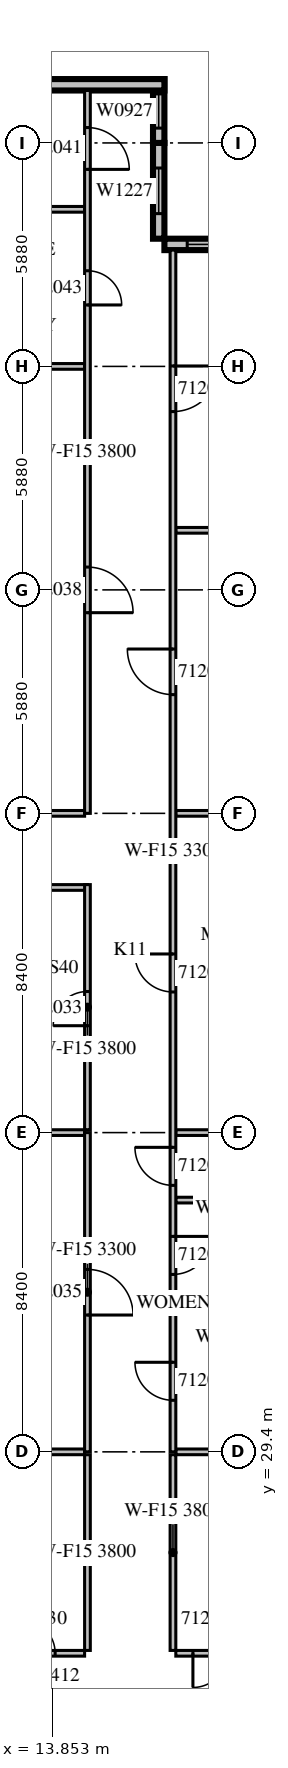
"""IFC4 building model, lengths in metres.
Left out: names, types, materials, properties, quantities, classifications, styles, units other than length and angle.
Written with IfcOpenShell. Run it as: python <this file> out.ifc"""

import sys

from ifc_helpers import new_model, si_unit, direction, frame, frame_2d, origin, place, context, subcontext, project, spatial, rectangle, extrude, source, transform, mapped, element, fill, save


model = new_model("IFC4")
c1 = context("Model", 3, precision=1e-05, world=origin(), true_north=direction((0.0, 1.0)))
c2 = subcontext(c1, "Body", "Model", "MODEL_VIEW")
j1 = project(units=[si_unit("LENGTHUNIT", "METRE"), si_unit("PLANEANGLEUNIT", "RADIAN")], contexts=[c1])
p1 = place(None, origin())
s1 = spatial("IfcSite", under=j1, at=p1, CompositionType="ELEMENT")
p2 = place(p1, origin())
s2 = spatial("IfcBuilding", under=s1, at=p2, CompositionType="ELEMENT")
p3 = place(p2, frame((0.0, 0.0, 61.5)))
s3 = spatial("IfcBuildingStorey", under=s2, at=p3, CompositionType="ELEMENT", Elevation=61.5)
m1 = source(origin(), c2, "Body", "SweptSolid", [
    extrude(rectangle(XDim=4.2, YDim=0.3, at=frame_2d((2.1, 0.0))), origin(), (0.0, 0.0, 1.0), 3.8),
])
p4 = place(p3, frame((21.0, 61.17, 0.0), z_axis=(0.0, 0.0, 1.0), x_axis=(-1.0, 0.0, 0.0)))
e1 = element("IfcWall", 1, at=p4, inside=s3, PredefinedType="STANDARD", context=c2, shape_type="MappedRepresentation", body=[
    mapped(m1, transform((0.0, 0.0, 0.0), scale=1.0)),
])
m2 = source(origin(), c2, "Body", "SweptSolid", [
    extrude(rectangle(XDim=3.0, YDim=2.7, at=frame_2d((1.5, 1.35))), frame((0.0, 0.16, 0.0), z_axis=(0.0, -1.0, 0.0), x_axis=(1.0, 0.0, 0.0)), (0.0, 0.0, 1.0), 0.32),
])
p5 = place(p4, frame((0.6, 0.0, 0.6)))
e2 = element("IfcOpeningElement", 2, at=p5, cuts=e1, PredefinedType="OPENING", context=c2, shape_type="MappedRepresentation", body=[
    mapped(m2, transform((0.0, 0.0, 0.0), scale=1.0)),
])
m3 = source(origin(), c2, "Body", "SweptSolid", [
    extrude(rectangle(XDim=2.52, YDim=0.3, at=frame_2d((1.26, 0.0))), origin(), (0.0, 0.0, 1.0), 3.8),
])
p6 = place(p3, frame((16.65, 61.32, 0.0), z_axis=(0.0, 0.0, 1.0), x_axis=(0.0, 1.0, 0.0)))
e3 = element("IfcWall", 3, at=p6, inside=s3, PredefinedType="STANDARD", context=c2, shape_type="MappedRepresentation", body=[
    mapped(m3, transform((0.0, 0.0, 0.0), scale=1.0)),
])
m4 = source(origin(), c2, "Body", "SweptSolid", [
    extrude(rectangle(XDim=1.2, YDim=2.7, at=frame_2d((0.6, 1.35))), frame((0.0, 0.16, 0.0), z_axis=(0.0, -1.0, 0.0), x_axis=(1.0, 0.0, 0.0)), (0.0, 0.0, 1.0), 0.32),
])
p7 = place(p6, frame((0.66, 0.0, 0.6)))
e4 = element("IfcOpeningElement", 4, at=p7, cuts=e3, PredefinedType="OPENING", context=c2, shape_type="MappedRepresentation", body=[
    mapped(m4, transform((0.0, 0.0, 0.0), scale=1.0)),
])
m5 = source(origin(), c2, "Body", "SweptSolid", [
    extrude(rectangle(XDim=1.68, YDim=0.3, at=frame_2d((0.84, 0.0))), origin(), (0.0, 0.0, 1.0), 3.8),
])
p8 = place(p3, frame((16.65, 63.84, 0.0), z_axis=(0.0, 0.0, 1.0), x_axis=(0.0, 1.0, 0.0)))
e5 = element("IfcWall", 5, at=p8, inside=s3, PredefinedType="STANDARD", context=c2, shape_type="MappedRepresentation", body=[
    mapped(m5, transform((0.0, 0.0, 0.0), scale=1.0)),
])
m6 = source(origin(), c2, "Body", "SweptSolid", [
    extrude(rectangle(XDim=0.9, YDim=2.7, at=frame_2d((0.45, 1.35))), frame((0.0, 0.16, 0.0), z_axis=(0.0, -1.0, 0.0), x_axis=(1.0, 0.0, 0.0)), (0.0, 0.0, 1.0), 0.32),
])
p9 = place(p8, frame((0.39, 0.0, 0.6)))
e6 = element("IfcOpeningElement", 6, at=p9, cuts=e5, PredefinedType="OPENING", context=c2, shape_type="MappedRepresentation", body=[
    mapped(m6, transform((0.0, 0.0, 0.0), scale=1.0)),
])
m7 = source(origin(), c2, "Body", "SweptSolid", [
    extrude(rectangle(XDim=3.15, YDim=0.3, at=frame_2d((1.575, 0.0))), origin(), (0.0, 0.0, 1.0), 3.8),
])
p10 = place(p3, frame((16.8, 65.37, 0.0), z_axis=(0.0, 0.0, 1.0), x_axis=(-1.0, 0.0, 0.0)))
e7 = element("IfcWall", 7, at=p10, inside=s3, PredefinedType="STANDARD", context=c2, shape_type="MappedRepresentation", body=[
    mapped(m7, transform((0.0, 0.0, 0.0), scale=1.0)),
])
p11 = place(p3, frame((3.075, 24.1, 0.0), z_axis=(0.0, 0.0, 1.0), x_axis=(1.0, 0.0, 0.0)))
e8 = element("IfcWall", 8, at=p11, inside=s3, PredefinedType="PARTITIONING", context=c2, shape_type="SweptSolid", body=[
    extrude(rectangle(XDim=11.625, YDim=0.15, at=frame_2d((5.812, 0.0))), origin(), (0.0, 0.0, 1.0), 3.8),
])
m8 = source(origin(), c2, "Body", "SweptSolid", [
    extrude(rectangle(XDim=0.9, YDim=2.1, at=frame_2d((0.45, 1.05))), frame((0.0, 0.085, 0.0), z_axis=(0.0, -1.0, 0.0), x_axis=(1.0, 0.0, 0.0)), (0.0, 0.0, 1.0), 0.17),
])
p12 = place(p11, frame((3.263, 0.0, 0.0)))
e9 = element("IfcOpeningElement", 9, at=p12, cuts=e8, PredefinedType="OPENING", context=c2, shape_type="MappedRepresentation", body=[
    mapped(m8, transform((0.0, 0.0, 0.0), scale=1.0)),
])
p13 = place(p11, frame((9.95, 0.0, 0.0)))
e10 = element("IfcOpeningElement", 10, at=p13, cuts=e8, PredefinedType="OPENING", context=c2, shape_type="MappedRepresentation", body=[
    mapped(m8, transform((0.0, 0.0, 0.0), scale=1.0)),
])
m9 = source(origin(), c2, "Body", "SweptSolid", [
    extrude(rectangle(XDim=3.6, YDim=0.15, at=frame_2d((1.8, 0.0))), origin(), (0.0, 0.0, 1.0), 3.8),
])
p14 = place(p3, frame((17.1, 24.1, 0.0), z_axis=(0.0, 0.0, 1.0), x_axis=(1.0, 0.0, 0.0)))
e11 = element("IfcWall", 11, at=p14, inside=s3, PredefinedType="PARTITIONING", context=c2, shape_type="MappedRepresentation", body=[
    mapped(m9, transform((0.0, 0.0, 0.0), scale=1.0)),
])
p15 = place(p14, frame((0.45, 0.0, 0.0)))
e12 = element("IfcOpeningElement", 12, at=p15, cuts=e11, PredefinedType="OPENING", context=c2, shape_type="MappedRepresentation", body=[
    mapped(m8, transform((0.0, 0.0, 0.0), scale=1.0)),
])
m10 = source(origin(), c2, "Body", "SweptSolid", [
    extrude(rectangle(XDim=5.15, YDim=0.15, at=frame_2d((2.575, 0.0))), origin(), (0.0, 0.0, 1.0), 3.8),
])
for number, where, z_axis, x_axis in (
    (13, (14.775, 24.175, 0.0), (0.0, 0.0, 1.0), (0.0, 1.0, 0.0)),
    (14, (17.025, 29.325, 0.0), (0.0, 0.0, 1.0), (0.0, -1.0, 0.0)),
):
    element("IfcWall", number, at=place(p3, frame(where, z_axis=z_axis, x_axis=x_axis)), inside=s3, PredefinedType="PARTITIONING", context=c2, shape_type="MappedRepresentation", body=[
        mapped(m10, transform((0.0, 0.0, 0.0), scale=1.0)),
    ])
m11 = source(origin(), c2, "Body", "SweptSolid", [
    extrude(rectangle(XDim=3.601, YDim=0.15, at=frame_2d((1.8, 0.0))), origin(), (0.0, 0.0, 1.0), 3.8),
])
p16 = place(p3, frame((14.7, 29.4, 0.0), z_axis=(0.0, 0.0, 1.0), x_axis=(-1.0, 0.0, 0.0)))
e15 = element("IfcWall", 15, at=p16, inside=s3, PredefinedType="PARTITIONING", context=c2, shape_type="MappedRepresentation", body=[
    mapped(m11, transform((0.0, 0.0, 0.0), scale=1.0)),
])
m12 = source(origin(), c2, "Body", "SweptSolid", [
    extrude(rectangle(XDim=2.701, YDim=0.15, at=frame_2d((1.351, 0.0))), origin(), (0.0, 0.0, 1.0), 3.8),
])
p17 = place(p3, frame((19.801, 29.4, 0.0), z_axis=(0.0, 0.0, 1.0), x_axis=(-1.0, 0.0, 0.0)))
e16 = element("IfcWall", 16, at=p17, inside=s3, PredefinedType="PARTITIONING", context=c2, shape_type="MappedRepresentation", body=[
    mapped(m12, transform((0.0, 0.0, 0.0), scale=1.0)),
])
m13 = source(origin(), c2, "Body", "SweptSolid", [
    extrude(rectangle(XDim=2.475, YDim=0.15, at=frame_2d((1.238, 0.0))), origin(), (0.0, 0.0, 1.0), 3.8),
])
p18 = place(p3, frame((14.775, 44.25, 0.0), z_axis=(0.0, 0.0, 1.0), x_axis=(-1.0, 0.0, 0.0)))
e17 = element("IfcWall", 17, at=p18, inside=s3, PredefinedType="PARTITIONING", context=c2, shape_type="MappedRepresentation", body=[
    mapped(m13, transform((0.0, 0.0, 0.0), scale=1.0)),
])
m14 = source(origin(), c2, "Body", "SweptSolid", [
    extrude(rectangle(XDim=6.45, YDim=0.15, at=frame_2d((3.225, 0.0))), origin(), (0.0, 0.0, 1.0), 3.8),
])
p19 = place(p3, frame((14.775, 37.875, 0.0), z_axis=(0.0, 0.0, 1.0), x_axis=(0.0, 1.0, 0.0)))
e18 = element("IfcWall", 18, at=p19, inside=s3, PredefinedType="PARTITIONING", context=c2, shape_type="MappedRepresentation", body=[
    mapped(m14, transform((0.0, 0.0, 0.0), scale=1.0)),
])
p20 = place(p19, frame((2.737, 0.0, 0.0)))
e19 = element("IfcOpeningElement", 19, at=p20, cuts=e18, PredefinedType="OPENING", context=c2, shape_type="MappedRepresentation", body=[
    mapped(m8, transform((0.0, 0.0, 0.0), scale=1.0)),
])
m15 = source(origin(), c2, "Body", "SweptSolid", [
    extrude(rectangle(XDim=3.45, YDim=0.15, at=frame_2d((1.725, 0.0))), origin(), (0.0, 0.0, 1.0), 3.8),
])
for number, where, z_axis, x_axis in (
    (20, (14.7, 37.8, 0.0), (0.0, 0.0, 1.0), (-1.0, 0.0, 0.0)),
    (21, (14.7, 62.093, 0.0), (0.0, 0.0, 1.0), (-1.0, 0.0, 0.0)),
    (22, (14.7, 46.2, 0.0), (0.0, 0.0, 1.0), (-1.0, 0.0, 0.0)),
    (23, (14.7, 57.96, 0.0), (0.0, 0.0, 1.0), (-1.0, 0.0, 0.0)),
):
    element("IfcWall", number, at=place(p3, frame(where, z_axis=z_axis, x_axis=x_axis)), inside=s3, PredefinedType="PARTITIONING", context=c2, shape_type="MappedRepresentation", body=[
        mapped(m15, transform((0.0, 0.0, 0.0), scale=1.0)),
    ])
m16 = source(origin(), c2, "Body", "SweptSolid", [
    extrude(rectangle(XDim=3.6, YDim=0.15, at=frame_2d((1.8, 0.0))), origin(), (0.0, 0.0, 1.0), 2.8),
])
for number, where, z_axis, x_axis in (
    (24, (17.1, 33.113, 0.0), (0.0, 0.0, 1.0), (1.0, 0.0, 0.0)),
    (25, (17.1, 36.024, 0.0), (0.0, 0.0, 1.0), (1.0, 0.0, 0.0)),
):
    element("IfcWall", number, at=place(p3, frame(where, z_axis=z_axis, x_axis=x_axis)), inside=s3, PredefinedType="PARTITIONING", context=c2, shape_type="MappedRepresentation", body=[
        mapped(m16, transform((0.0, 0.0, 0.0), scale=1.0)),
    ])
p21 = place(p3, frame((17.1, 53.648, 0.0), z_axis=(0.0, 0.0, 1.0), x_axis=(1.0, 0.0, 0.0)))
e26 = element("IfcWall", 26, at=p21, inside=s3, PredefinedType="PARTITIONING", context=c2, shape_type="MappedRepresentation", body=[
    mapped(m9, transform((0.0, 0.0, 0.0), scale=1.0)),
])
for number, where, z_axis, x_axis in (
    (27, (19.801, 37.8, 0.0), (0.0, 0.0, 1.0), (-1.0, 0.0, 0.0)),
    (28, (19.801, 46.2, 0.0), (0.0, 0.0, 1.0), (-1.0, 0.0, 0.0)),
):
    element("IfcWall", number, at=place(p3, frame(where, z_axis=z_axis, x_axis=x_axis)), inside=s3, PredefinedType="PARTITIONING", context=c2, shape_type="MappedRepresentation", body=[
        mapped(m12, transform((0.0, 0.0, 0.0), scale=1.0)),
    ])
m17 = source(origin(), c2, "Body", "SweptSolid", [
    extrude(rectangle(XDim=8.4, YDim=0.15, at=frame_2d((4.2, 0.0))), origin(), (0.0, 0.0, 1.0), 3.3),
])
p22 = place(p3, frame((14.775, 29.4, 0.0), z_axis=(0.0, 0.0, 1.0), x_axis=(0.0, 1.0, 0.0)))
e29 = element("IfcWall", 29, at=p22, inside=s3, PredefinedType="PARTITIONING", context=c2, shape_type="MappedRepresentation", body=[
    mapped(m17, transform((0.0, 0.0, 0.0), scale=1.0)),
])
m18 = source(origin(), c2, "Body", "SweptSolid", [
    extrude(rectangle(XDim=1.2, YDim=2.1, at=frame_2d((0.6, 1.05))), frame((0.0, 0.085, 0.0), z_axis=(0.0, -1.0, 0.0), x_axis=(1.0, 0.0, 0.0)), (0.0, 0.0, 1.0), 0.17),
])
p23 = place(p22, frame((3.6, 0.0, 0.0)))
e30 = element("IfcOpeningElement", 30, at=p23, cuts=e29, PredefinedType="OPENING", context=c2, shape_type="MappedRepresentation", body=[
    mapped(m18, transform((0.0, 0.0, 0.0), scale=1.0)),
])
m19 = source(origin(), c2, "Body", "SweptSolid", [
    extrude(rectangle(XDim=19.02, YDim=0.15, at=frame_2d((9.51, 0.0))), origin(), (0.0, 0.0, 1.0), 3.8),
])
p24 = place(p3, frame((14.775, 46.2, 0.0), z_axis=(0.0, 0.0, 1.0), x_axis=(0.0, 1.0, 0.0)))
e31 = element("IfcWall", 31, at=p24, inside=s3, PredefinedType="PARTITIONING", context=c2, shape_type="MappedRepresentation", body=[
    mapped(m19, transform((0.0, 0.0, 0.0), scale=1.0)),
])
p25 = place(p24, frame((5.28, 0.0, 0.0)))
e32 = element("IfcOpeningElement", 32, at=p25, cuts=e31, PredefinedType="OPENING", context=c2, shape_type="MappedRepresentation", body=[
    mapped(m18, transform((0.0, 0.0, 0.0), scale=1.0)),
])
m20 = source(origin(), c2, "Body", "SweptSolid", [
    extrude(rectangle(XDim=1.1, YDim=2.1, at=frame_2d((0.55, 1.05))), frame((0.0, 0.085, 0.0), z_axis=(0.0, -1.0, 0.0), x_axis=(1.0, 0.0, 0.0)), (0.0, 0.0, 1.0), 0.17),
])
p26 = place(p24, frame((16.944, 0.0, 0.0)))
e33 = element("IfcOpeningElement", 33, at=p26, cuts=e31, PredefinedType="OPENING", context=c2, shape_type="MappedRepresentation", body=[
    mapped(m20, transform((0.0, 0.0, 0.0), scale=1.0)),
])
p27 = place(p24, frame((13.377, 0.0, 0.0)))
e34 = element("IfcOpeningElement", 34, at=p27, cuts=e31, PredefinedType="OPENING", context=c2, shape_type="MappedRepresentation", body=[
    mapped(m8, transform((0.0, 0.0, 0.0), scale=1.0)),
])
m21 = source(origin(), c2, "Body", "SweptSolid", [
    extrude(rectangle(XDim=31.62, YDim=0.15, at=frame_2d((15.81, 0.0))), origin(), (0.0, 0.0, 1.0), 3.3),
])
p28 = place(p3, frame((17.025, 61.02, 0.0), z_axis=(0.0, 0.0, 1.0), x_axis=(0.0, -1.0, 0.0)))
e35 = element("IfcWall", 35, at=p28, inside=s3, PredefinedType="PARTITIONING", context=c2, shape_type="MappedRepresentation", body=[
    mapped(m21, transform((0.0, 0.0, 0.0), scale=1.0)),
])
m22 = source(origin(), c2, "Body", "SweptSolid", [
    extrude(rectangle(XDim=1.0, YDim=2.1, at=frame_2d((0.5, 1.05))), frame((0.0, 0.085, 0.0), z_axis=(0.0, -1.0, 0.0), x_axis=(1.0, 0.0, 0.0)), (0.0, 0.0, 1.0), 0.17),
])
p29 = place(p28, frame((29.263, 0.0, 0.0)))
e36 = element("IfcOpeningElement", 36, at=p29, cuts=e35, PredefinedType="OPENING", context=c2, shape_type="MappedRepresentation", body=[
    mapped(m22, transform((0.0, 0.0, 0.0), scale=1.0)),
])
p30 = place(p28, frame((25.951, 0.0, 0.0)))
e37 = element("IfcOpeningElement", 37, at=p30, cuts=e35, PredefinedType="OPENING", context=c2, shape_type="MappedRepresentation", body=[
    mapped(m22, transform((0.0, 0.0, 0.0), scale=1.0)),
])
p31 = place(p28, frame((23.608, 0.0, 0.0)))
e38 = element("IfcOpeningElement", 38, at=p31, cuts=e35, PredefinedType="OPENING", context=c2, shape_type="MappedRepresentation", body=[
    mapped(m22, transform((0.0, 0.0, 0.0), scale=1.0)),
])
p32 = place(p28, frame((18.52, 0.0, 0.0)))
e39 = element("IfcOpeningElement", 39, at=p32, cuts=e35, PredefinedType="OPENING", context=c2, shape_type="MappedRepresentation", body=[
    mapped(m22, transform((0.0, 0.0, 0.0), scale=1.0)),
])
p33 = place(p28, frame((10.496, 0.0, 0.0)))
e40 = element("IfcOpeningElement", 40, at=p33, cuts=e35, PredefinedType="OPENING", context=c2, shape_type="MappedRepresentation", body=[
    mapped(m18, transform((0.0, 0.0, 0.0), scale=1.0)),
])
p34 = place(p28, frame((3.049, 0.0, 0.0)))
e41 = element("IfcOpeningElement", 41, at=p34, cuts=e35, PredefinedType="OPENING", context=c2, shape_type="MappedRepresentation", body=[
    mapped(m18, transform((0.0, 0.0, 0.0), scale=1.0)),
])
m23 = source(origin(), c2, "Body", "SweptSolid", [
    extrude(rectangle(XDim=3.0, YDim=2.7, at=frame_2d((1.5, 1.35))), frame((0.0, 0.03, 0.0), z_axis=(0.0, -1.0, 0.0), x_axis=(1.0, 0.0, 0.0)), (0.0, 0.0, 1.0), 0.06),
])
p35 = place(p5, origin())
e42 = element("IfcWindow", 42, at=p35, inside=s3, PartitioningType="SINGLE_PANEL", PredefinedType="WINDOW", context=c2, shape_type="MappedRepresentation", body=[
    mapped(m23, transform((0.0, 0.0, 0.0), scale=1.0)),
])
fill(e2, e42)
m24 = source(origin(), c2, "Body", "SweptSolid", [
    extrude(rectangle(XDim=1.2, YDim=2.7, at=frame_2d((0.6, 1.35))), frame((0.0, 0.03, 0.0), z_axis=(0.0, -1.0, 0.0), x_axis=(1.0, 0.0, 0.0)), (0.0, 0.0, 1.0), 0.06),
])
p36 = place(p7, origin())
e43 = element("IfcWindow", 43, at=p36, inside=s3, PartitioningType="SINGLE_PANEL", PredefinedType="WINDOW", context=c2, shape_type="MappedRepresentation", body=[
    mapped(m24, transform((0.0, 0.0, 0.0), scale=1.0)),
])
fill(e4, e43)
m25 = source(origin(), c2, "Body", "SweptSolid", [
    extrude(rectangle(XDim=0.9, YDim=2.7, at=frame_2d((0.45, 1.35))), frame((0.0, 0.03, 0.0), z_axis=(0.0, -1.0, 0.0), x_axis=(1.0, 0.0, 0.0)), (0.0, 0.0, 1.0), 0.06),
])
p37 = place(p9, origin())
e44 = element("IfcWindow", 44, at=p37, inside=s3, PartitioningType="SINGLE_PANEL", PredefinedType="WINDOW", context=c2, shape_type="MappedRepresentation", body=[
    mapped(m25, transform((0.0, 0.0, 0.0), scale=1.0)),
])
fill(e6, e44)
m26 = source(origin(), c2, "Body", "SweptSolid", [
    extrude(rectangle(XDim=0.9, YDim=2.1, at=frame_2d((0.45, 1.05))), frame((0.0, 0.025, 0.0), z_axis=(0.0, -1.0, 0.0), x_axis=(1.0, 0.0, 0.0)), (0.0, 0.0, 1.0), 0.05),
])
p38 = place(p13, origin())
e45 = element("IfcDoor", 45, at=p38, inside=s3, OperationType="SINGLE_SWING_LEFT", PredefinedType="DOOR", context=c2, shape_type="MappedRepresentation", body=[
    mapped(m26, transform((0.0, 0.0, 0.0), scale=1.0)),
])
fill(e10, e45)
p39 = place(p15, origin())
e46 = element("IfcDoor", 46, at=p39, inside=s3, OperationType="SINGLE_SWING_RIGHT", PredefinedType="DOOR", context=c2, shape_type="MappedRepresentation", body=[
    mapped(m26, transform((0.0, 0.0, 0.0), scale=1.0)),
])
fill(e12, e46)
p40 = place(p20, origin())
e47 = element("IfcDoor", 47, at=p40, inside=s3, OperationType="SINGLE_SWING_LEFT", PredefinedType="DOOR", context=c2, shape_type="MappedRepresentation", body=[
    mapped(m26, transform((0.0, 0.0, 0.0), scale=1.0)),
])
fill(e19, e47)
m27 = source(origin(), c2, "Body", "SweptSolid", [
    extrude(rectangle(XDim=1.2, YDim=2.1, at=frame_2d((0.6, 1.05))), frame((0.0, 0.025, 0.0), z_axis=(0.0, -1.0, 0.0), x_axis=(1.0, 0.0, 0.0)), (0.0, 0.0, 1.0), 0.05),
])
p41 = place(p23, origin())
e48 = element("IfcDoor", 48, at=p41, inside=s3, OperationType="SINGLE_SWING_RIGHT", PredefinedType="DOOR", context=c2, shape_type="MappedRepresentation", body=[
    mapped(m27, transform((0.0, 0.0, 0.0), scale=1.0)),
])
fill(e30, e48)
p42 = place(p25, origin())
e49 = element("IfcDoor", 49, at=p42, inside=s3, OperationType="SINGLE_SWING_RIGHT", PredefinedType="DOOR", context=c2, shape_type="MappedRepresentation", body=[
    mapped(m27, transform((0.0, 0.0, 0.0), scale=1.0)),
])
fill(e32, e49)
m28 = source(origin(), c2, "Body", "SweptSolid", [
    extrude(rectangle(XDim=1.1, YDim=2.1, at=frame_2d((0.55, 1.05))), frame((0.0, 0.025, 0.0), z_axis=(0.0, -1.0, 0.0), x_axis=(1.0, 0.0, 0.0)), (0.0, 0.0, 1.0), 0.05),
])
p43 = place(p26, origin())
e50 = element("IfcDoor", 50, at=p43, inside=s3, OperationType="SINGLE_SWING_RIGHT", PredefinedType="DOOR", context=c2, shape_type="MappedRepresentation", body=[
    mapped(m28, transform((0.0, 0.0, 0.0), scale=1.0)),
])
fill(e33, e50)
p44 = place(p27, origin())
e51 = element("IfcDoor", 51, at=p44, inside=s3, OperationType="SINGLE_SWING_RIGHT", PredefinedType="DOOR", context=c2, shape_type="MappedRepresentation", body=[
    mapped(m26, transform((0.0, 0.0, 0.0), scale=1.0)),
])
fill(e34, e51)
m29 = source(origin(), c2, "Body", "SweptSolid", [
    extrude(rectangle(XDim=1.0, YDim=2.1, at=frame_2d((0.5, 1.05))), frame((0.0, 0.025, 0.0), z_axis=(0.0, -1.0, 0.0), x_axis=(1.0, 0.0, 0.0)), (0.0, 0.0, 1.0), 0.05),
])
p45 = place(p29, origin())
e52 = element("IfcDoor", 52, at=p45, inside=s3, OperationType="SINGLE_SWING_RIGHT", PredefinedType="DOOR", context=c2, shape_type="MappedRepresentation", body=[
    mapped(m29, transform((0.0, 0.0, 0.0), scale=1.0)),
])
fill(e36, e52)
p46 = place(p30, origin())
e53 = element("IfcDoor", 53, at=p46, inside=s3, OperationType="SINGLE_SWING_LEFT", PredefinedType="DOOR", context=c2, shape_type="MappedRepresentation", body=[
    mapped(m29, transform((0.0, 0.0, 0.0), scale=1.0)),
])
fill(e37, e53)
p47 = place(p31, origin())
e54 = element("IfcDoor", 54, at=p47, inside=s3, OperationType="SINGLE_SWING_RIGHT", PredefinedType="DOOR", context=c2, shape_type="MappedRepresentation", body=[
    mapped(m29, transform((0.0, 0.0, 0.0), scale=1.0)),
])
fill(e38, e54)
p48 = place(p32, origin())
e55 = element("IfcDoor", 55, at=p48, inside=s3, OperationType="SINGLE_SWING_RIGHT", PredefinedType="DOOR", context=c2, shape_type="MappedRepresentation", body=[
    mapped(m29, transform((0.0, 0.0, 0.0), scale=1.0)),
])
fill(e39, e55)
p49 = place(p33, origin())
e56 = element("IfcDoor", 56, at=p49, inside=s3, OperationType="SINGLE_SWING_RIGHT", PredefinedType="DOOR", context=c2, shape_type="MappedRepresentation", body=[
    mapped(m27, transform((0.0, 0.0, 0.0), scale=1.0)),
])
fill(e40, e56)
p50 = place(p34, origin())
e57 = element("IfcDoor", 57, at=p50, inside=s3, OperationType="SINGLE_SWING_LEFT", PredefinedType="DOOR", context=c2, shape_type="MappedRepresentation", body=[
    mapped(m27, transform((0.0, 0.0, 0.0), scale=1.0)),
])
fill(e41, e57)
save(model, sys.argv[1])
